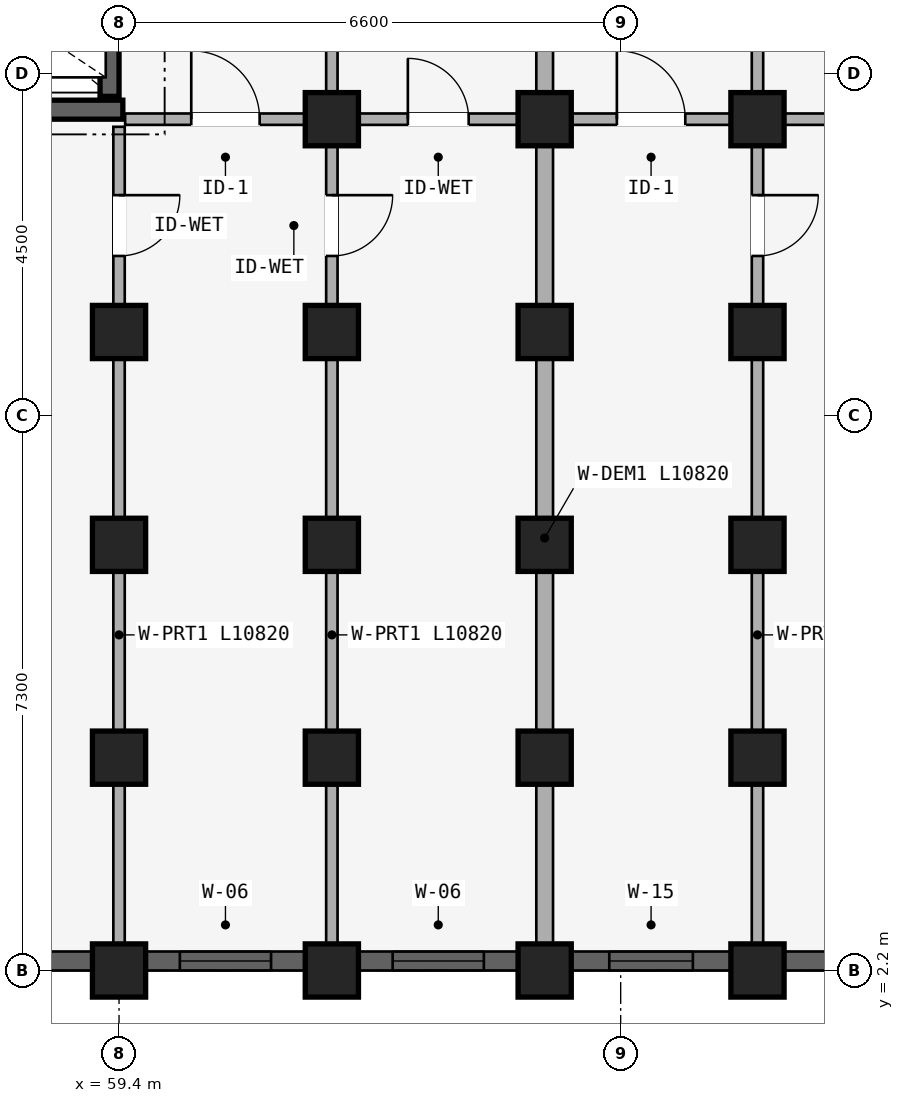
"""IFC4 building model, lengths in metres.
Left out: names, types, materials, properties, quantities, classifications, styles, units other than length and angle.
Written with IfcOpenShell. Run it as: python <this file> out.ifc"""

import sys

from ifc_helpers import new_model, si_unit, direction, frame, frame_2d, origin, origin_2d, place, context, subcontext, project, spatial, rectangle, extrude, element, fill, save


model = new_model("IFC4")
c1 = context("Model", 3, precision=1e-05, world=origin(), true_north=direction((0.0, 1.0)))
c2 = subcontext(c1, "Body", "Model", "MODEL_VIEW")
j1 = project(units=[si_unit("LENGTHUNIT", "METRE"), si_unit("PLANEANGLEUNIT", "RADIAN")], contexts=[c1])
p1 = place(None, origin())
s1 = spatial("IfcSite", under=j1, at=p1, CompositionType="ELEMENT")
p2 = place(p1, origin())
s2 = spatial("IfcBuilding", under=s1, at=p2, CompositionType="ELEMENT")
p3 = place(p2, frame((0.0, 0.0, 18.15)))
s3 = spatial("IfcBuildingStorey", under=s2, at=p3, CompositionType="ELEMENT", Elevation=18.15)
p4 = place(p3, frame((56.65, 13.525, 0.0), z_axis=(0.0, 0.0, 1.0), x_axis=(1.0, 0.0, 0.0)))
e1 = element("IfcWall", 1, at=p4, inside=s3, PredefinedType="SHEAR", context=c2, shape_type="SweptSolid", body=[
    extrude(rectangle(XDim=2.8, YDim=0.25, at=frame_2d((1.4, 0.0))), origin(), (0.0, 0.0, 1.0), 2.93),
])
p5 = place(p3, frame((59.275, 15.85, 0.0), z_axis=(0.0, 0.0, 1.0), x_axis=(0.0, -1.0, 0.0)))
e2 = element("IfcWall", 2, at=p5, inside=s3, PredefinedType="SHEAR", context=c2, shape_type="SweptSolid", body=[
    extrude(rectangle(XDim=2.15, YDim=0.25, at=frame_2d((1.075, 0.0))), origin(), (0.0, 0.0, 1.0), 2.93),
])
for number, where, z_axis, x_axis in (
    (3, (59.4, 10.6, 0.0), (0.0, 0.0, 1.0), (1.0, 0.0, 0.0)),
    (4, (59.4, 7.8, 0.0), (0.0, 0.0, 1.0), (1.0, 0.0, 0.0)),
    (5, (59.4, 5.0, 0.0), (0.0, 0.0, 1.0), (1.0, 0.0, 0.0)),
):
    element("IfcColumn", number, at=place(p3, frame(where, z_axis=z_axis, x_axis=x_axis)), inside=s3, PredefinedType="COLUMN", context=c2, shape_type="SweptSolid", body=[
        extrude(rectangle(XDim=0.7, YDim=0.7, at=origin_2d()), origin(), (0.0, 0.0, 1.0), 2.93),
    ])
p6 = place(p3, frame((59.4, 2.2, 0.0), z_axis=(0.0, 0.0, 1.0), x_axis=(1.0, 0.0, 0.0)))
e6 = element("IfcColumn", 6, at=p6, inside=s3, PredefinedType="COLUMN", context=c2, shape_type="SweptSolid", body=[
    extrude(rectangle(XDim=0.7, YDim=0.7, at=origin_2d()), origin(), (0.0, 0.0, 1.0), 2.97),
])
for number, where, z_axis, x_axis in (
    (7, (62.2, 13.4, 0.0), (0.0, 0.0, 1.0), (1.0, 0.0, 0.0)),
    (8, (62.2, 10.6, 0.0), (0.0, 0.0, 1.0), (1.0, 0.0, 0.0)),
    (9, (62.2, 7.8, 0.0), (0.0, 0.0, 1.0), (1.0, 0.0, 0.0)),
    (10, (62.2, 5.0, 0.0), (0.0, 0.0, 1.0), (1.0, 0.0, 0.0)),
):
    element("IfcColumn", number, at=place(p3, frame(where, z_axis=z_axis, x_axis=x_axis)), inside=s3, PredefinedType="COLUMN", context=c2, shape_type="SweptSolid", body=[
        extrude(rectangle(XDim=0.7, YDim=0.7, at=origin_2d()), origin(), (0.0, 0.0, 1.0), 2.93),
    ])
p7 = place(p3, frame((62.2, 2.2, 0.0), z_axis=(0.0, 0.0, 1.0), x_axis=(1.0, 0.0, 0.0)))
e11 = element("IfcColumn", 11, at=p7, inside=s3, PredefinedType="COLUMN", context=c2, shape_type="SweptSolid", body=[
    extrude(rectangle(XDim=0.7, YDim=0.7, at=origin_2d()), origin(), (0.0, 0.0, 1.0), 2.97),
])
for number, where, z_axis, x_axis in (
    (12, (65.0, 13.4, 0.0), (0.0, 0.0, 1.0), (1.0, 0.0, 0.0)),
    (13, (65.0, 10.6, 0.0), (0.0, 0.0, 1.0), (1.0, 0.0, 0.0)),
    (14, (65.0, 7.8, 0.0), (0.0, 0.0, 1.0), (1.0, 0.0, 0.0)),
    (15, (65.0, 5.0, 0.0), (0.0, 0.0, 1.0), (1.0, 0.0, 0.0)),
):
    element("IfcColumn", number, at=place(p3, frame(where, z_axis=z_axis, x_axis=x_axis)), inside=s3, PredefinedType="COLUMN", context=c2, shape_type="SweptSolid", body=[
        extrude(rectangle(XDim=0.7, YDim=0.7, at=origin_2d()), origin(), (0.0, 0.0, 1.0), 2.93),
    ])
p8 = place(p3, frame((65.0, 2.2, 0.0), z_axis=(0.0, 0.0, 1.0), x_axis=(1.0, 0.0, 0.0)))
e16 = element("IfcColumn", 16, at=p8, inside=s3, PredefinedType="COLUMN", context=c2, shape_type="SweptSolid", body=[
    extrude(rectangle(XDim=0.7, YDim=0.7, at=origin_2d()), origin(), (0.0, 0.0, 1.0), 2.97),
])
for number, where, z_axis, x_axis in (
    (17, (67.8, 13.4, 0.0), (0.0, 0.0, 1.0), (1.0, 0.0, 0.0)),
    (18, (67.8, 10.6, 0.0), (0.0, 0.0, 1.0), (1.0, 0.0, 0.0)),
    (19, (67.8, 7.8, 0.0), (0.0, 0.0, 1.0), (1.0, 0.0, 0.0)),
    (20, (67.8, 5.0, 0.0), (0.0, 0.0, 1.0), (1.0, 0.0, 0.0)),
):
    element("IfcColumn", number, at=place(p3, frame(where, z_axis=z_axis, x_axis=x_axis)), inside=s3, PredefinedType="COLUMN", context=c2, shape_type="SweptSolid", body=[
        extrude(rectangle(XDim=0.7, YDim=0.7, at=origin_2d()), origin(), (0.0, 0.0, 1.0), 2.93),
    ])
p9 = place(p3, frame((67.8, 2.2, 0.0), z_axis=(0.0, 0.0, 1.0), x_axis=(1.0, 0.0, 0.0)))
e21 = element("IfcColumn", 21, at=p9, inside=s3, PredefinedType="COLUMN", context=c2, shape_type="SweptSolid", body=[
    extrude(rectangle(XDim=0.7, YDim=0.7, at=origin_2d()), origin(), (0.0, 0.0, 1.0), 2.97),
])
p10 = place(p3, frame((59.48, 13.4, 0.0), z_axis=(0.0, 0.0, 1.0), x_axis=(1.0, 0.0, 0.0)))
e22 = element("IfcWall", 22, at=p10, inside=s3, PredefinedType="PLUMBINGWALL", context=c2, shape_type="SweptSolid", body=[
    extrude(rectangle(XDim=2.64, YDim=0.15, at=frame_2d((1.32, 0.0))), origin(), (0.0, 0.0, 1.0), 2.372),
])
p11 = place(p10, frame((0.87, 0.0, 0.0)))
e23 = element("IfcOpeningElement", 23, at=p11, cuts=e22, PredefinedType="OPENING", context=c2, shape_type="SweptSolid", body=[
    extrude(rectangle(XDim=0.9, YDim=2.1, at=frame_2d((0.45, 1.05))), frame((0.0, 0.085, 0.0), z_axis=(0.0, -1.0, 0.0), x_axis=(1.0, 0.0, 0.0)), (0.0, 0.0, 1.0), 0.17),
])
p12 = place(p3, frame((62.28, 13.4, 0.0), z_axis=(0.0, 0.0, 1.0), x_axis=(1.0, 0.0, 0.0)))
e24 = element("IfcWall", 24, at=p12, inside=s3, PredefinedType="PLUMBINGWALL", context=c2, shape_type="SweptSolid", body=[
    extrude(rectangle(XDim=2.64, YDim=0.15, at=frame_2d((1.32, 0.0))), origin(), (0.0, 0.0, 1.0), 2.372),
])
p13 = place(p12, frame((0.92, 0.0, 0.0)))
e25 = element("IfcOpeningElement", 25, at=p13, cuts=e24, PredefinedType="OPENING", context=c2, shape_type="SweptSolid", body=[
    extrude(rectangle(XDim=0.8, YDim=2.1, at=frame_2d((0.4, 1.05))), frame((0.0, 0.085, 0.0), z_axis=(0.0, -1.0, 0.0), x_axis=(1.0, 0.0, 0.0)), (0.0, 0.0, 1.0), 0.17),
])
p14 = place(p3, frame((65.08, 13.4, 0.0), z_axis=(0.0, 0.0, 1.0), x_axis=(1.0, 0.0, 0.0)))
e26 = element("IfcWall", 26, at=p14, inside=s3, PredefinedType="PLUMBINGWALL", context=c2, shape_type="SweptSolid", body=[
    extrude(rectangle(XDim=2.64, YDim=0.15, at=frame_2d((1.32, 0.0))), origin(), (0.0, 0.0, 1.0), 2.372),
])
p15 = place(p14, frame((0.87, 0.0, 0.0)))
e27 = element("IfcOpeningElement", 27, at=p15, cuts=e26, PredefinedType="OPENING", context=c2, shape_type="SweptSolid", body=[
    extrude(rectangle(XDim=0.9, YDim=2.1, at=frame_2d((0.45, 1.05))), frame((0.0, 0.085, 0.0), z_axis=(0.0, -1.0, 0.0), x_axis=(1.0, 0.0, 0.0)), (0.0, 0.0, 1.0), 0.17),
])
p16 = place(p3, frame((67.88, 13.4, 0.0), z_axis=(0.0, 0.0, 1.0), x_axis=(1.0, 0.0, 0.0)))
e28 = element("IfcWall", 28, at=p16, inside=s3, PredefinedType="PLUMBINGWALL", context=c2, shape_type="SweptSolid", body=[
    extrude(rectangle(XDim=2.64, YDim=0.15, at=frame_2d((1.32, 0.0))), origin(), (0.0, 0.0, 1.0), 2.372),
])
p17 = place(p16, frame((0.92, 0.0, 0.0)))
e29 = element("IfcOpeningElement", 29, at=p17, cuts=e28, PredefinedType="OPENING", context=c2, shape_type="SweptSolid", body=[
    extrude(rectangle(XDim=0.8, YDim=2.1, at=frame_2d((0.4, 1.05))), frame((0.0, 0.085, 0.0), z_axis=(0.0, -1.0, 0.0), x_axis=(1.0, 0.0, 0.0)), (0.0, 0.0, 1.0), 0.17),
])
p18 = place(p3, frame((59.4, 13.3, 0.0), z_axis=(0.0, 0.0, 1.0), x_axis=(0.0, -1.0, 0.0)))
e30 = element("IfcWall", 30, at=p18, inside=s3, PredefinedType="PARTITIONING", context=c2, shape_type="SweptSolid", body=[
    extrude(rectangle(XDim=10.82, YDim=0.15, at=frame_2d((5.41, 0.0))), origin(), (0.0, 0.0, 1.0), 2.372),
])
p19 = place(p18, frame((0.899, 0.0, 0.0)))
e31 = element("IfcOpeningElement", 31, at=p19, cuts=e30, PredefinedType="OPENING", context=c2, shape_type="SweptSolid", body=[
    extrude(rectangle(XDim=0.8, YDim=2.1, at=frame_2d((0.4, 1.05))), frame((0.0, 0.085, 0.0), z_axis=(0.0, -1.0, 0.0), x_axis=(1.0, 0.0, 0.0)), (0.0, 0.0, 1.0), 0.17),
])
p20 = place(p3, frame((62.2, 19.95, 0.0), z_axis=(0.0, 0.0, 1.0), x_axis=(0.0, -1.0, 0.0)))
e32 = element("IfcWall", 32, at=p20, inside=s3, PredefinedType="PARTITIONING", context=c2, shape_type="SweptSolid", body=[
    extrude(rectangle(XDim=6.53, YDim=0.15, at=frame_2d((3.265, 0.0))), origin(), (0.0, 0.0, 1.0), 2.372),
])
p21 = place(p20, frame((2.815, 0.0, 0.0)))
e33 = element("IfcOpeningElement", 33, at=p21, cuts=e32, PredefinedType="OPENING", context=c2, shape_type="SweptSolid", body=[
    extrude(rectangle(XDim=0.9, YDim=2.1, at=frame_2d((0.45, 1.05))), frame((0.0, 0.085, 0.0), z_axis=(0.0, -1.0, 0.0), x_axis=(1.0, 0.0, 0.0)), (0.0, 0.0, 1.0), 0.17),
])
p22 = place(p3, frame((62.2, 13.3, 0.0), z_axis=(0.0, 0.0, 1.0), x_axis=(0.0, -1.0, 0.0)))
e34 = element("IfcWall", 34, at=p22, inside=s3, PredefinedType="PARTITIONING", context=c2, shape_type="SweptSolid", body=[
    extrude(rectangle(XDim=10.82, YDim=0.15, at=frame_2d((5.41, 0.0))), origin(), (0.0, 0.0, 1.0), 2.372),
])
p23 = place(p22, frame((0.899, 0.0, 0.0)))
e35 = element("IfcOpeningElement", 35, at=p23, cuts=e34, PredefinedType="OPENING", context=c2, shape_type="SweptSolid", body=[
    extrude(rectangle(XDim=0.8, YDim=2.1, at=frame_2d((0.4, 1.05))), frame((0.0, 0.085, 0.0), z_axis=(0.0, -1.0, 0.0), x_axis=(1.0, 0.0, 0.0)), (0.0, 0.0, 1.0), 0.17),
])
p24 = place(p3, frame((65.0, 19.95, 0.0), z_axis=(0.0, 0.0, 1.0), x_axis=(0.0, -1.0, 0.0)))
e36 = element("IfcWall", 36, at=p24, inside=s3, PredefinedType="STANDARD", context=c2, shape_type="SweptSolid", body=[
    extrude(rectangle(XDim=6.53, YDim=0.22, at=frame_2d((3.265, 0.0))), origin(), (0.0, 0.0, 1.0), 2.372),
])
p25 = place(p3, frame((65.0, 13.3, 0.0), z_axis=(0.0, 0.0, 1.0), x_axis=(0.0, -1.0, 0.0)))
e37 = element("IfcWall", 37, at=p25, inside=s3, PredefinedType="STANDARD", context=c2, shape_type="SweptSolid", body=[
    extrude(rectangle(XDim=10.82, YDim=0.22, at=frame_2d((5.41, 0.0))), origin(), (0.0, 0.0, 1.0), 2.372),
])
p26 = place(p3, frame((67.8, 19.95, 0.0), z_axis=(0.0, 0.0, 1.0), x_axis=(0.0, -1.0, 0.0)))
e38 = element("IfcWall", 38, at=p26, inside=s3, PredefinedType="PARTITIONING", context=c2, shape_type="SweptSolid", body=[
    extrude(rectangle(XDim=6.53, YDim=0.15, at=frame_2d((3.265, 0.0))), origin(), (0.0, 0.0, 1.0), 2.372),
])
p27 = place(p26, frame((2.815, 0.0, 0.0)))
e39 = element("IfcOpeningElement", 39, at=p27, cuts=e38, PredefinedType="OPENING", context=c2, shape_type="SweptSolid", body=[
    extrude(rectangle(XDim=0.9, YDim=2.1, at=frame_2d((0.45, 1.05))), frame((0.0, 0.085, 0.0), z_axis=(0.0, -1.0, 0.0), x_axis=(1.0, 0.0, 0.0)), (0.0, 0.0, 1.0), 0.17),
])
p28 = place(p3, frame((67.8, 13.3, 0.0), z_axis=(0.0, 0.0, 1.0), x_axis=(0.0, -1.0, 0.0)))
e40 = element("IfcWall", 40, at=p28, inside=s3, PredefinedType="PARTITIONING", context=c2, shape_type="SweptSolid", body=[
    extrude(rectangle(XDim=10.82, YDim=0.15, at=frame_2d((5.41, 0.0))), origin(), (0.0, 0.0, 1.0), 2.372),
])
p29 = place(p28, frame((0.899, 0.0, 0.0)))
e41 = element("IfcOpeningElement", 41, at=p29, cuts=e40, PredefinedType="OPENING", context=c2, shape_type="SweptSolid", body=[
    extrude(rectangle(XDim=0.8, YDim=2.1, at=frame_2d((0.4, 1.05))), frame((0.0, 0.085, 0.0), z_axis=(0.0, -1.0, 0.0), x_axis=(1.0, 0.0, 0.0)), (0.0, 0.0, 1.0), 0.17),
])
p30 = place(p3, frame((54.154, 2.325, 0.0), z_axis=(0.0, 0.0, 1.0), x_axis=(1.0, 0.0, 0.0)))
e42 = element("IfcWall", 42, at=p30, inside=s3, PredefinedType="STANDARD", context=c2, shape_type="SweptSolid", body=[
    extrude(rectangle(XDim=4.893, YDim=0.25, at=frame_2d((2.446, 0.0))), origin(), (0.0, 0.0, 1.0), 2.48),
])
p31 = place(p30, frame((1.971, 0.0, 0.88)))
e43 = element("IfcOpeningElement", 43, at=p31, cuts=e42, PredefinedType="OPENING", context=c2, shape_type="SweptSolid", body=[
    extrude(rectangle(XDim=0.95, YDim=1.35, at=frame_2d((0.475, 0.675))), frame((0.0, 0.135, 0.0), z_axis=(0.0, -1.0, 0.0), x_axis=(1.0, 0.0, 0.0)), (0.0, 0.0, 1.0), 0.27),
])
p32 = place(p3, frame((59.753, 2.325, 0.0), z_axis=(0.0, 0.0, 1.0), x_axis=(1.0, 0.0, 0.0)))
e44 = element("IfcWall", 44, at=p32, inside=s3, PredefinedType="STANDARD", context=c2, shape_type="SweptSolid", body=[
    extrude(rectangle(XDim=2.093, YDim=0.25, at=frame_2d((1.046, 0.0))), origin(), (0.0, 0.0, 1.0), 2.48),
])
p33 = place(p32, frame((0.447, 0.0, 0.78)))
e45 = element("IfcOpeningElement", 45, at=p33, cuts=e44, PredefinedType="OPENING", context=c2, shape_type="SweptSolid", body=[
    extrude(rectangle(XDim=1.2, YDim=1.5, at=frame_2d((0.6, 0.75))), frame((0.0, 0.135, 0.0), z_axis=(0.0, -1.0, 0.0), x_axis=(1.0, 0.0, 0.0)), (0.0, 0.0, 1.0), 0.27),
])
p34 = place(p3, frame((62.553, 2.325, 0.0), z_axis=(0.0, 0.0, 1.0), x_axis=(1.0, 0.0, 0.0)))
e46 = element("IfcWall", 46, at=p34, inside=s3, PredefinedType="STANDARD", context=c2, shape_type="SweptSolid", body=[
    extrude(rectangle(XDim=2.093, YDim=0.25, at=frame_2d((1.046, 0.0))), origin(), (0.0, 0.0, 1.0), 2.48),
])
p35 = place(p34, frame((0.447, 0.0, 0.78)))
e47 = element("IfcOpeningElement", 47, at=p35, cuts=e46, PredefinedType="OPENING", context=c2, shape_type="SweptSolid", body=[
    extrude(rectangle(XDim=1.2, YDim=1.5, at=frame_2d((0.6, 0.75))), frame((0.0, 0.135, 0.0), z_axis=(0.0, -1.0, 0.0), x_axis=(1.0, 0.0, 0.0)), (0.0, 0.0, 1.0), 0.27),
])
p36 = place(p3, frame((65.354, 2.325, 0.0), z_axis=(0.0, 0.0, 1.0), x_axis=(1.0, 0.0, 0.0)))
e48 = element("IfcWall", 48, at=p36, inside=s3, PredefinedType="STANDARD", context=c2, shape_type="SweptSolid", body=[
    extrude(rectangle(XDim=2.093, YDim=0.25, at=frame_2d((1.046, 0.0))), origin(), (0.0, 0.0, 1.0), 2.48),
])
p37 = place(p36, frame((0.497, 0.0, 0.83)))
e49 = element("IfcOpeningElement", 49, at=p37, cuts=e48, PredefinedType="OPENING", context=c2, shape_type="SweptSolid", body=[
    extrude(rectangle(XDim=1.1, YDim=1.45, at=frame_2d((0.55, 0.725))), frame((0.0, 0.135, 0.0), z_axis=(0.0, -1.0, 0.0), x_axis=(1.0, 0.0, 0.0)), (0.0, 0.0, 1.0), 0.27),
])
p38 = place(p3, frame((68.154, 2.325, 0.0), z_axis=(0.0, 0.0, 1.0), x_axis=(1.0, 0.0, 0.0)))
e50 = element("IfcWall", 50, at=p38, inside=s3, PredefinedType="STANDARD", context=c2, shape_type="SweptSolid", body=[
    extrude(rectangle(XDim=2.093, YDim=0.25, at=frame_2d((1.046, 0.0))), origin(), (0.0, 0.0, 1.0), 2.48),
])
p39 = place(p38, frame((0.572, 0.0, 0.88)))
e51 = element("IfcOpeningElement", 51, at=p39, cuts=e50, PredefinedType="OPENING", context=c2, shape_type="SweptSolid", body=[
    extrude(rectangle(XDim=0.95, YDim=1.35, at=frame_2d((0.475, 0.675))), frame((0.0, 0.135, 0.0), z_axis=(0.0, -1.0, 0.0), x_axis=(1.0, 0.0, 0.0)), (0.0, 0.0, 1.0), 0.27),
])
p40 = place(p33, origin())
e52 = element("IfcWindow", 52, at=p40, inside=s3, PartitioningType="SINGLE_PANEL", PredefinedType="WINDOW", context=c2, shape_type="SweptSolid", body=[
    extrude(rectangle(XDim=1.2, YDim=1.5, at=frame_2d((0.6, 0.75))), frame((0.0, 0.03, 0.0), z_axis=(0.0, -1.0, 0.0), x_axis=(1.0, 0.0, 0.0)), (0.0, 0.0, 1.0), 0.06),
])
fill(e45, e52)
p41 = place(p35, origin())
e53 = element("IfcWindow", 53, at=p41, inside=s3, PartitioningType="SINGLE_PANEL", PredefinedType="WINDOW", context=c2, shape_type="SweptSolid", body=[
    extrude(rectangle(XDim=1.2, YDim=1.5, at=frame_2d((0.6, 0.75))), frame((0.0, 0.03, 0.0), z_axis=(0.0, -1.0, 0.0), x_axis=(1.0, 0.0, 0.0)), (0.0, 0.0, 1.0), 0.06),
])
fill(e47, e53)
p42 = place(p37, origin())
e54 = element("IfcWindow", 54, at=p42, inside=s3, PartitioningType="SINGLE_PANEL", PredefinedType="WINDOW", context=c2, shape_type="SweptSolid", body=[
    extrude(rectangle(XDim=1.1, YDim=1.45, at=frame_2d((0.55, 0.725))), frame((0.0, 0.03, 0.0), z_axis=(0.0, -1.0, 0.0), x_axis=(1.0, 0.0, 0.0)), (0.0, 0.0, 1.0), 0.06),
])
fill(e49, e54)
p43 = place(p11, origin())
e55 = element("IfcDoor", 55, at=p43, inside=s3, OperationType="SINGLE_SWING_LEFT", PredefinedType="DOOR", context=c2, shape_type="SweptSolid", body=[
    extrude(rectangle(XDim=0.9, YDim=2.1, at=frame_2d((0.45, 1.05))), frame((0.0, 0.025, 0.0), z_axis=(0.0, -1.0, 0.0), x_axis=(1.0, 0.0, 0.0)), (0.0, 0.0, 1.0), 0.05),
])
fill(e23, e55)
p44 = place(p13, origin())
e56 = element("IfcDoor", 56, at=p44, inside=s3, OperationType="SINGLE_SWING_LEFT", PredefinedType="DOOR", context=c2, shape_type="SweptSolid", body=[
    extrude(rectangle(XDim=0.8, YDim=2.1, at=frame_2d((0.4, 1.05))), frame((0.0, 0.025, 0.0), z_axis=(0.0, -1.0, 0.0), x_axis=(1.0, 0.0, 0.0)), (0.0, 0.0, 1.0), 0.05),
])
fill(e25, e56)
p45 = place(p15, origin())
e57 = element("IfcDoor", 57, at=p45, inside=s3, OperationType="SINGLE_SWING_LEFT", PredefinedType="DOOR", context=c2, shape_type="SweptSolid", body=[
    extrude(rectangle(XDim=0.9, YDim=2.1, at=frame_2d((0.45, 1.05))), frame((0.0, 0.025, 0.0), z_axis=(0.0, -1.0, 0.0), x_axis=(1.0, 0.0, 0.0)), (0.0, 0.0, 1.0), 0.05),
])
fill(e27, e57)
p46 = place(p19, frame((0.8, 0.0, 0.0), z_axis=(0.0, 0.0, 1.0), x_axis=(-1.0, 0.0, 0.0)))
e58 = element("IfcDoor", 58, at=p46, inside=s3, OperationType="SINGLE_SWING_RIGHT", PredefinedType="DOOR", context=c2, shape_type="SweptSolid", body=[
    extrude(rectangle(XDim=0.8, YDim=2.1, at=frame_2d((0.4, 1.05))), frame((0.0, 0.025, 0.0), z_axis=(0.0, -1.0, 0.0), x_axis=(1.0, 0.0, 0.0)), (0.0, 0.0, 1.0), 0.05),
])
fill(e31, e58)
p47 = place(p23, origin())
e59 = element("IfcDoor", 59, at=p47, inside=s3, OperationType="SINGLE_SWING_LEFT", PredefinedType="DOOR", context=c2, shape_type="SweptSolid", body=[
    extrude(rectangle(XDim=0.8, YDim=2.1, at=frame_2d((0.4, 1.05))), frame((0.0, 0.025, 0.0), z_axis=(0.0, -1.0, 0.0), x_axis=(1.0, 0.0, 0.0)), (0.0, 0.0, 1.0), 0.05),
])
fill(e35, e59)
p48 = place(p29, frame((0.8, 0.0, 0.0), z_axis=(0.0, 0.0, 1.0), x_axis=(-1.0, 0.0, 0.0)))
e60 = element("IfcDoor", 60, at=p48, inside=s3, OperationType="SINGLE_SWING_RIGHT", PredefinedType="DOOR", context=c2, shape_type="SweptSolid", body=[
    extrude(rectangle(XDim=0.8, YDim=2.1, at=frame_2d((0.4, 1.05))), frame((0.0, 0.025, 0.0), z_axis=(0.0, -1.0, 0.0), x_axis=(1.0, 0.0, 0.0)), (0.0, 0.0, 1.0), 0.05),
])
fill(e41, e60)
save(model, sys.argv[1])
